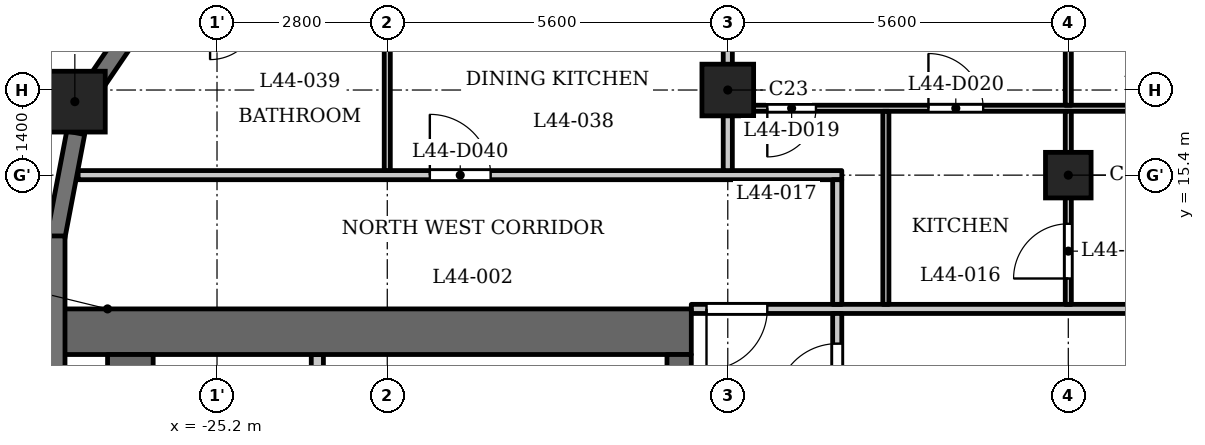
"""IFC4 building model, lengths in metres.
Left out: names, types, materials, properties, quantities, classifications, styles, units other than length and angle.
Written with IfcOpenShell. Run it as: python <this file> out.ifc"""

import sys

from ifc_helpers import new_model, si_unit, direction, frame, frame_2d, origin, origin_2d, place, context, subcontext, project, spatial, rectangle, extrude, element, fill, save


model = new_model("IFC4")
c1 = context("Model", 3, precision=1e-05, world=origin(), true_north=direction((0.0, 1.0)))
c2 = subcontext(c1, "Body", "Model", "MODEL_VIEW")
j1 = project(units=[si_unit("LENGTHUNIT", "METRE"), si_unit("PLANEANGLEUNIT", "RADIAN")], contexts=[c1])
p1 = place(None, origin())
s1 = spatial("IfcSite", under=j1, at=p1, CompositionType="ELEMENT")
p2 = place(p1, origin())
s2 = spatial("IfcBuilding", under=s1, at=p2, CompositionType="ELEMENT")
p3 = place(p2, frame((0.0, 0.0, 171.1)))
s3 = spatial("IfcBuildingStorey", under=s2, at=p3, CompositionType="ELEMENT", Elevation=171.1)
p4 = place(p3, frame((-27.538, 16.609, 0.0), z_axis=(0.0, 0.0, 1.0), x_axis=(1.0, 0.0, 0.0)))
e1 = element("IfcColumn", 1, at=p4, inside=s3, PredefinedType="COLUMN", context=c2, shape_type="SweptSolid", body=[
    extrude(rectangle(XDim=1.0, YDim=1.0, at=origin_2d()), origin(), (0.0, 0.0, 1.0), 3.5),
])
p5 = place(p3, frame((-16.8, 16.8, 0.0), z_axis=(0.0, 0.0, 1.0), x_axis=(1.0, 0.0, 0.0)))
e2 = element("IfcColumn", 2, at=p5, inside=s3, PredefinedType="COLUMN", context=c2, shape_type="SweptSolid", body=[
    extrude(rectangle(XDim=0.85, YDim=0.85, at=origin_2d()), origin(), (0.0, 0.0, 1.0), 3.5),
])
p6 = place(p3, frame((-11.2, 15.4, 0.0), z_axis=(0.0, 0.0, 1.0), x_axis=(1.0, 0.0, 0.0)))
e3 = element("IfcColumn", 3, at=p6, inside=s3, PredefinedType="COLUMN", context=c2, shape_type="SweptSolid", body=[
    extrude(rectangle(XDim=0.75, YDim=0.75, at=origin_2d()), origin(), (0.0, 0.0, 1.0), 3.5),
])
p7 = place(p3, frame((-26.504, 17.934, 0.0), z_axis=(0.0, 0.0, 1.0), x_axis=(-0.562145470373, -0.827038372833, 0.0)))
e4 = element("IfcWall", 4, at=p7, inside=s3, PredefinedType="SOLIDWALL", context=c2, shape_type="SweptSolid", body=[
    extrude(rectangle(XDim=1.177, YDim=0.3, at=frame_2d((0.588, 0.0))), origin(), (0.0, 0.0, 1.0), 3.2),
])
p8 = place(p3, frame((-27.524, 16.097, 0.0), z_axis=(0.0, 0.0, 1.0), x_axis=(-0.187259034321, -0.982310569049, 0.0)))
e5 = element("IfcWall", 5, at=p8, inside=s3, PredefinedType="SOLIDWALL", context=c2, shape_type="SweptSolid", body=[
    extrude(rectangle(XDim=1.756, YDim=0.3, at=frame_2d((0.878, 0.0))), origin(), (0.0, 0.0, 1.0), 2.45),
])
p9 = place(p3, frame((-27.85, 14.4, 0.0), z_axis=(0.0, 0.0, 1.0), x_axis=(0.0, -1.0, 0.0)))
e6 = element("IfcWall", 6, at=p9, inside=s3, PredefinedType="SOLIDWALL", context=c2, shape_type="SweptSolid", body=[
    extrude(rectangle(XDim=2.7, YDim=0.3, at=frame_2d((1.35, 0.0))), origin(), (0.0, 0.0, 1.0), 2.45),
])
p10 = place(p3, frame((-17.4, 12.825, 0.0), z_axis=(0.0, 0.0, 1.0), x_axis=(-1.0, 0.0, 0.0)))
e7 = element("IfcWall", 7, at=p10, inside=s3, PredefinedType="SHEAR", context=c2, shape_type="SweptSolid", body=[
    extrude(rectangle(XDim=10.4, YDim=0.75, at=frame_2d((5.2, 0.0))), origin(), (0.0, 0.0, 1.0), 3.2),
])
p11 = place(p3, frame((-17.6, -12.45, 0.0), z_axis=(0.0, 0.0, 1.0), x_axis=(0.0, 1.0, 0.0)))
e8 = element("IfcWall", 8, at=p11, inside=s3, PredefinedType="SHEAR", context=c2, shape_type="SweptSolid", body=[
    extrude(rectangle(XDim=24.9, YDim=0.4, at=frame_2d((12.45, 0.0))), origin(), (0.0, 0.0, 1.0), 3.2),
])
p12 = place(p11, frame((8.65, 0.0, 0.0)))
e9 = element("IfcOpeningElement", 9, at=p12, cuts=e8, PredefinedType="OPENING", context=c2, shape_type="SweptSolid", body=[
    extrude(rectangle(XDim=0.9, YDim=2.1, at=frame_2d((0.45, 1.05))), frame((0.0, 0.21, 0.0), z_axis=(0.0, -1.0, 0.0), x_axis=(1.0, 0.0, 0.0)), (0.0, 0.0, 1.0), 0.42),
])
p13 = place(p11, frame((15.6, 0.0, 0.0)))
e10 = element("IfcOpeningElement", 10, at=p13, cuts=e8, PredefinedType="OPENING", context=c2, shape_type="SweptSolid", body=[
    extrude(rectangle(XDim=1.1, YDim=2.1, at=frame_2d((0.55, 1.05))), frame((0.0, 0.21, 0.0), z_axis=(0.0, -1.0, 0.0), x_axis=(1.0, 0.0, 0.0)), (0.0, 0.0, 1.0), 0.42),
])
p14 = place(p11, frame((18.0, 0.0, 0.0)))
e11 = element("IfcOpeningElement", 11, at=p14, cuts=e8, PredefinedType="OPENING", context=c2, shape_type="SweptSolid", body=[
    extrude(rectangle(XDim=1.1, YDim=2.1, at=frame_2d((0.55, 1.05))), frame((0.0, 0.21, 0.0), z_axis=(0.0, -1.0, 0.0), x_axis=(1.0, 0.0, 0.0)), (0.0, 0.0, 1.0), 0.42),
])
p15 = place(p11, frame((23.025, 0.0, 0.0)))
e12 = element("IfcOpeningElement", 12, at=p15, cuts=e8, PredefinedType="OPENING", context=c2, shape_type="SweptSolid", body=[
    extrude(rectangle(XDim=1.1, YDim=2.1, at=frame_2d((0.55, 1.05))), frame((0.0, 0.21, 0.0), z_axis=(0.0, -1.0, 0.0), x_axis=(1.0, 0.0, 0.0)), (0.0, 0.0, 1.0), 0.42),
])
p16 = place(p11, frame((0.775, 0.0, 0.0)))
e13 = element("IfcOpeningElement", 13, at=p16, cuts=e8, PredefinedType="OPENING", context=c2, shape_type="SweptSolid", body=[
    extrude(rectangle(XDim=1.1, YDim=2.1, at=frame_2d((0.55, 1.05))), frame((0.0, 0.21, 0.0), z_axis=(0.0, -1.0, 0.0), x_axis=(1.0, 0.0, 0.0)), (0.0, 0.0, 1.0), 0.42),
])
p17 = place(p11, frame((12.925, 0.0, 0.0)))
e14 = element("IfcOpeningElement", 14, at=p17, cuts=e8, PredefinedType="OPENING", context=c2, shape_type="SweptSolid", body=[
    extrude(rectangle(XDim=1.8, YDim=2.1, at=frame_2d((0.9, 1.05))), frame((0.0, 0.21, 0.0), z_axis=(0.0, -1.0, 0.0), x_axis=(1.0, 0.0, 0.0)), (0.0, 0.0, 1.0), 0.42),
])
p18 = place(p3, frame((-26.625, -12.45, 0.0), z_axis=(0.0, 0.0, 1.0), x_axis=(0.0, 1.0, 0.0)))
e15 = element("IfcWall", 15, at=p18, inside=s3, PredefinedType="SHEAR", context=c2, shape_type="SweptSolid", body=[
    extrude(rectangle(XDim=24.9, YDim=0.75, at=frame_2d((12.45, 0.0))), origin(), (0.0, 0.0, 1.0), 3.2),
])
p19 = place(p3, frame((-23.55, 9.8, 0.0), z_axis=(0.0, 0.0, 1.0), x_axis=(0.0, 1.0, 0.0)))
e16 = element("IfcWall", 16, at=p19, inside=s3, PredefinedType="PARTITIONING", context=c2, shape_type="SweptSolid", body=[
    extrude(rectangle(XDim=2.65, YDim=0.2, at=frame_2d((1.325, 0.0))), origin(), (0.0, 0.0, 1.0), 3.2),
])
p20 = place(p19, frame((0.875, 0.0, 0.0)))
e17 = element("IfcOpeningElement", 17, at=p20, cuts=e16, PredefinedType="OPENING", context=c2, shape_type="SweptSolid", body=[
    extrude(rectangle(XDim=0.9, YDim=2.1, at=frame_2d((0.45, 1.05))), frame((0.0, 0.11, 0.0), z_axis=(0.0, -1.0, 0.0), x_axis=(1.0, 0.0, 0.0)), (0.0, 0.0, 1.0), 0.22),
])
p21 = place(p3, frame((-17.4, 13.2, 0.0), z_axis=(0.0, 0.0, 1.0), x_axis=(1.0, 0.0, 0.0)))
e18 = element("IfcWall", 18, at=p21, inside=s3, PredefinedType="PARTITIONING", context=c2, shape_type="SweptSolid", body=[
    extrude(rectangle(XDim=34.8, YDim=0.15, at=frame_2d((17.4, 0.0))), origin(), (0.0, 0.0, 1.0), 3.2),
])
p22 = place(p21, frame((0.25, 0.0, 0.0)))
e19 = element("IfcOpeningElement", 19, at=p22, cuts=e18, PredefinedType="OPENING", context=c2, shape_type="SweptSolid", body=[
    extrude(rectangle(XDim=1.0, YDim=2.1, at=frame_2d((0.5, 1.05))), frame((0.0, 0.085, 0.0), z_axis=(0.0, -1.0, 0.0), x_axis=(1.0, 0.0, 0.0)), (0.0, 0.0, 1.0), 0.17),
])
p23 = place(p21, frame((33.65, 0.0, 0.0)))
e20 = element("IfcOpeningElement", 20, at=p23, cuts=e18, PredefinedType="OPENING", context=c2, shape_type="SweptSolid", body=[
    extrude(rectangle(XDim=1.0, YDim=2.1, at=frame_2d((0.5, 1.05))), frame((0.0, 0.085, 0.0), z_axis=(0.0, -1.0, 0.0), x_axis=(1.0, 0.0, 0.0)), (0.0, 0.0, 1.0), 0.17),
])
p24 = place(p21, frame((10.15, 0.0, 0.0)))
e21 = element("IfcOpeningElement", 21, at=p24, cuts=e18, PredefinedType="OPENING", context=c2, shape_type="SweptSolid", body=[
    extrude(rectangle(XDim=1.0, YDim=2.1, at=frame_2d((0.5, 1.05))), frame((0.0, 0.085, 0.0), z_axis=(0.0, -1.0, 0.0), x_axis=(1.0, 0.0, 0.0)), (0.0, 0.0, 1.0), 0.17),
])
p25 = place(p21, frame((15.75, 0.0, 0.0)))
e22 = element("IfcOpeningElement", 22, at=p25, cuts=e18, PredefinedType="OPENING", context=c2, shape_type="SweptSolid", body=[
    extrude(rectangle(XDim=1.0, YDim=2.1, at=frame_2d((0.5, 1.05))), frame((0.0, 0.085, 0.0), z_axis=(0.0, -1.0, 0.0), x_axis=(1.0, 0.0, 0.0)), (0.0, 0.0, 1.0), 0.17),
])
p26 = place(p21, frame((24.95, 0.0, 0.0)))
e23 = element("IfcOpeningElement", 23, at=p26, cuts=e18, PredefinedType="OPENING", context=c2, shape_type="SweptSolid", body=[
    extrude(rectangle(XDim=1.0, YDim=2.1, at=frame_2d((0.5, 1.05))), frame((0.0, 0.085, 0.0), z_axis=(0.0, -1.0, 0.0), x_axis=(1.0, 0.0, 0.0)), (0.0, 0.0, 1.0), 0.17),
])
p27 = place(p21, frame((29.95, 0.0, 0.0)))
e24 = element("IfcOpeningElement", 24, at=p27, cuts=e18, PredefinedType="OPENING", context=c2, shape_type="SweptSolid", body=[
    extrude(rectangle(XDim=1.0, YDim=2.1, at=frame_2d((0.5, 1.05))), frame((0.0, 0.085, 0.0), z_axis=(0.0, -1.0, 0.0), x_axis=(1.0, 0.0, 0.0)), (0.0, 0.0, 1.0), 0.17),
])
p28 = place(p3, frame((-27.484, 15.4, 0.0), z_axis=(0.0, 0.0, 1.0), x_axis=(1.0, 0.0, 0.0)))
e25 = element("IfcWall", 25, at=p28, inside=s3, PredefinedType="PARTITIONING", context=c2, shape_type="SweptSolid", body=[
    extrude(rectangle(XDim=12.559, YDim=0.15, at=frame_2d((6.279, 0.0))), origin(), (0.0, 0.0, 1.0), 3.2),
])
p29 = place(p28, frame((5.784, 0.0, 0.0)))
e26 = element("IfcOpeningElement", 26, at=p29, cuts=e25, PredefinedType="OPENING", context=c2, shape_type="SweptSolid", body=[
    extrude(rectangle(XDim=1.0, YDim=2.1, at=frame_2d((0.5, 1.05))), frame((0.0, 0.085, 0.0), z_axis=(0.0, -1.0, 0.0), x_axis=(1.0, 0.0, 0.0)), (0.0, 0.0, 1.0), 0.17),
])
p30 = place(p3, frame((-16.725, 16.5, 0.0), z_axis=(0.0, 0.0, 1.0), x_axis=(1.0, 0.0, 0.0)))
e27 = element("IfcWall", 27, at=p30, inside=s3, PredefinedType="PARTITIONING", context=c2, shape_type="SweptSolid", body=[
    extrude(rectangle(XDim=33.45, YDim=0.1, at=frame_2d((16.725, 0.0))), origin(), (0.0, 0.0, 1.0), 3.2),
])
p31 = place(p30, frame((0.575, 0.0, 0.0)))
e28 = element("IfcOpeningElement", 28, at=p31, cuts=e27, PredefinedType="OPENING", context=c2, shape_type="SweptSolid", body=[
    extrude(rectangle(XDim=0.8, YDim=2.1, at=frame_2d((0.4, 1.05))), frame((0.0, 0.06, 0.0), z_axis=(0.0, -1.0, 0.0), x_axis=(1.0, 0.0, 0.0)), (0.0, 0.0, 1.0), 0.12),
])
p32 = place(p30, frame((3.225, 0.0, 0.0)))
e29 = element("IfcOpeningElement", 29, at=p32, cuts=e27, PredefinedType="OPENING", context=c2, shape_type="SweptSolid", body=[
    extrude(rectangle(XDim=0.9, YDim=2.1, at=frame_2d((0.45, 1.05))), frame((0.0, 0.06, 0.0), z_axis=(0.0, -1.0, 0.0), x_axis=(1.0, 0.0, 0.0)), (0.0, 0.0, 1.0), 0.12),
])
p33 = place(p30, frame((6.775, 0.0, 0.0)))
e30 = element("IfcOpeningElement", 30, at=p33, cuts=e27, PredefinedType="OPENING", context=c2, shape_type="SweptSolid", body=[
    extrude(rectangle(XDim=0.9, YDim=2.1, at=frame_2d((0.45, 1.05))), frame((0.0, 0.06, 0.0), z_axis=(0.0, -1.0, 0.0), x_axis=(1.0, 0.0, 0.0)), (0.0, 0.0, 1.0), 0.12),
])
p34 = place(p30, frame((8.825, 0.0, 0.0)))
e31 = element("IfcOpeningElement", 31, at=p34, cuts=e27, PredefinedType="OPENING", context=c2, shape_type="SweptSolid", body=[
    extrude(rectangle(XDim=0.9, YDim=2.1, at=frame_2d((0.45, 1.05))), frame((0.0, 0.06, 0.0), z_axis=(0.0, -1.0, 0.0), x_axis=(1.0, 0.0, 0.0)), (0.0, 0.0, 1.0), 0.12),
])
p35 = place(p30, frame((20.775, 0.0, 0.0)))
e32 = element("IfcOpeningElement", 32, at=p35, cuts=e27, PredefinedType="OPENING", context=c2, shape_type="SweptSolid", body=[
    extrude(rectangle(XDim=0.8, YDim=2.1, at=frame_2d((0.4, 1.05))), frame((0.0, 0.06, 0.0), z_axis=(0.0, -1.0, 0.0), x_axis=(1.0, 0.0, 0.0)), (0.0, 0.0, 1.0), 0.12),
])
p36 = place(p30, frame((17.325, 0.0, 0.0)))
e33 = element("IfcOpeningElement", 33, at=p36, cuts=e27, PredefinedType="OPENING", context=c2, shape_type="SweptSolid", body=[
    extrude(rectangle(XDim=0.9, YDim=2.1, at=frame_2d((0.45, 1.05))), frame((0.0, 0.06, 0.0), z_axis=(0.0, -1.0, 0.0), x_axis=(1.0, 0.0, 0.0)), (0.0, 0.0, 1.0), 0.12),
])
p37 = place(p30, frame((12.375, 0.0, 0.0)))
e34 = element("IfcOpeningElement", 34, at=p37, cuts=e27, PredefinedType="OPENING", context=c2, shape_type="SweptSolid", body=[
    extrude(rectangle(XDim=0.9, YDim=2.1, at=frame_2d((0.45, 1.05))), frame((0.0, 0.06, 0.0), z_axis=(0.0, -1.0, 0.0), x_axis=(1.0, 0.0, 0.0)), (0.0, 0.0, 1.0), 0.12),
])
p38 = place(p30, frame((14.425, 0.0, 0.0)))
e35 = element("IfcOpeningElement", 35, at=p38, cuts=e27, PredefinedType="OPENING", context=c2, shape_type="SweptSolid", body=[
    extrude(rectangle(XDim=0.9, YDim=2.1, at=frame_2d((0.45, 1.05))), frame((0.0, 0.06, 0.0), z_axis=(0.0, -1.0, 0.0), x_axis=(1.0, 0.0, 0.0)), (0.0, 0.0, 1.0), 0.12),
])
p39 = place(p30, frame((26.575, 0.0, 0.0)))
e36 = element("IfcOpeningElement", 36, at=p39, cuts=e27, PredefinedType="OPENING", context=c2, shape_type="SweptSolid", body=[
    extrude(rectangle(XDim=0.8, YDim=2.1, at=frame_2d((0.4, 1.05))), frame((0.0, 0.06, 0.0), z_axis=(0.0, -1.0, 0.0), x_axis=(1.0, 0.0, 0.0)), (0.0, 0.0, 1.0), 0.12),
])
p40 = place(p30, frame((23.775, 0.0, 0.0)))
e37 = element("IfcOpeningElement", 37, at=p40, cuts=e27, PredefinedType="OPENING", context=c2, shape_type="SweptSolid", body=[
    extrude(rectangle(XDim=0.9, YDim=2.1, at=frame_2d((0.45, 1.05))), frame((0.0, 0.06, 0.0), z_axis=(0.0, -1.0, 0.0), x_axis=(1.0, 0.0, 0.0)), (0.0, 0.0, 1.0), 0.12),
])
p41 = place(p30, frame((32.075, 0.0, 0.0)))
e38 = element("IfcOpeningElement", 38, at=p41, cuts=e27, PredefinedType="OPENING", context=c2, shape_type="SweptSolid", body=[
    extrude(rectangle(XDim=0.8, YDim=2.1, at=frame_2d((0.4, 1.05))), frame((0.0, 0.06, 0.0), z_axis=(0.0, -1.0, 0.0), x_axis=(1.0, 0.0, 0.0)), (0.0, 0.0, 1.0), 0.12),
])
p42 = place(p30, frame((29.375, 0.0, 0.0)))
e39 = element("IfcOpeningElement", 39, at=p42, cuts=e27, PredefinedType="OPENING", context=c2, shape_type="SweptSolid", body=[
    extrude(rectangle(XDim=0.9, YDim=2.1, at=frame_2d((0.45, 1.05))), frame((0.0, 0.06, 0.0), z_axis=(0.0, -1.0, 0.0), x_axis=(1.0, 0.0, 0.0)), (0.0, 0.0, 1.0), 0.12),
])
p43 = place(p3, frame((-22.4, 15.475, 0.0), z_axis=(0.0, 0.0, 1.0), x_axis=(0.0, 1.0, 0.0)))
e40 = element("IfcWall", 40, at=p43, inside=s3, PredefinedType="PARTITIONING", context=c2, shape_type="SweptSolid", body=[
    extrude(rectangle(XDim=2.575, YDim=0.1, at=frame_2d((1.288, 0.0))), origin(), (0.0, 0.0, 1.0), 3.2),
])
p44 = place(p3, frame((-16.8, 15.475, 0.0), z_axis=(0.0, 0.0, 1.0), x_axis=(0.0, 1.0, 0.0)))
e41 = element("IfcWall", 41, at=p44, inside=s3, PredefinedType="PARTITIONING", context=c2, shape_type="SweptSolid", body=[
    extrude(rectangle(XDim=7.405, YDim=0.15, at=frame_2d((3.702, 0.0))), origin(), (0.0, 0.0, 1.0), 3.2),
])
p45 = place(p3, frame((-15.0, 6.769, 0.0), z_axis=(0.0, 0.0, 1.0), x_axis=(0.0, 1.0, 0.0)))
e42 = element("IfcWall", 42, at=p45, inside=s3, PredefinedType="PARTITIONING", context=c2, shape_type="SweptSolid", body=[
    extrude(rectangle(XDim=6.356, YDim=0.15, at=frame_2d((3.178, 0.0))), origin(), (0.0, 0.0, 1.0), 3.2),
])
p46 = place(p45, frame((4.86, 0.0, 0.0)))
e43 = element("IfcOpeningElement", 43, at=p46, cuts=e42, PredefinedType="OPENING", context=c2, shape_type="SweptSolid", body=[
    extrude(rectangle(XDim=1.0, YDim=2.1, at=frame_2d((0.5, 1.05))), frame((0.0, 0.085, 0.0), z_axis=(0.0, -1.0, 0.0), x_axis=(1.0, 0.0, 0.0)), (0.0, 0.0, 1.0), 0.17),
])
p47 = place(p3, frame((-15.0, 13.275, 0.0), z_axis=(0.0, 0.0, 1.0), x_axis=(0.0, 1.0, 0.0)))
e44 = element("IfcWall", 44, at=p47, inside=s3, PredefinedType="PARTITIONING", context=c2, shape_type="SweptSolid", body=[
    extrude(rectangle(XDim=2.05, YDim=0.15, at=frame_2d((1.025, 0.0))), origin(), (0.0, 0.0, 1.0), 3.2),
])
p48 = place(p3, frame((-14.2, 13.275, 0.0), z_axis=(0.0, 0.0, 1.0), x_axis=(0.0, 1.0, 0.0)))
e45 = element("IfcWall", 45, at=p48, inside=s3, PredefinedType="PARTITIONING", context=c2, shape_type="SweptSolid", body=[
    extrude(rectangle(XDim=3.175, YDim=0.1, at=frame_2d((1.587, 0.0))), origin(), (0.0, 0.0, 1.0), 3.2),
])
p49 = place(p3, frame((-11.2, 13.275, 0.0), z_axis=(0.0, 0.0, 1.0), x_axis=(0.0, 1.0, 0.0)))
e46 = element("IfcWall", 46, at=p49, inside=s3, PredefinedType="PARTITIONING", context=c2, shape_type="SweptSolid", body=[
    extrude(rectangle(XDim=3.175, YDim=0.1, at=frame_2d((1.587, 0.0))), origin(), (0.0, 0.0, 1.0), 3.2),
])
p50 = place(p49, frame((0.425, 0.0, 0.0)))
e47 = element("IfcOpeningElement", 47, at=p50, cuts=e46, PredefinedType="OPENING", context=c2, shape_type="SweptSolid", body=[
    extrude(rectangle(XDim=0.9, YDim=2.1, at=frame_2d((0.45, 1.05))), frame((0.0, 0.06, 0.0), z_axis=(0.0, -1.0, 0.0), x_axis=(1.0, 0.0, 0.0)), (0.0, 0.0, 1.0), 0.12),
])
p51 = place(p3, frame((-11.2, 16.55, 0.0), z_axis=(0.0, 0.0, 1.0), x_axis=(0.0, 1.0, 0.0)))
e48 = element("IfcWall", 48, at=p51, inside=s3, PredefinedType="PARTITIONING", context=c2, shape_type="SweptSolid", body=[
    extrude(rectangle(XDim=6.33, YDim=0.1, at=frame_2d((3.165, 0.0))), origin(), (0.0, 0.0, 1.0), 3.2),
])
p52 = place(p46, origin())
e49 = element("IfcDoor", 49, at=p52, inside=s3, OperationType="SINGLE_SWING_RIGHT", PredefinedType="DOOR", context=c2, shape_type="SweptSolid", body=[
    extrude(rectangle(XDim=1.0, YDim=2.1, at=frame_2d((0.5, 1.05))), frame((0.0, 0.025, 0.0), z_axis=(0.0, -1.0, 0.0), x_axis=(1.0, 0.0, 0.0)), (0.0, 0.0, 1.0), 0.05),
])
fill(e43, e49)
p53 = place(p22, origin())
e50 = element("IfcDoor", 50, at=p53, inside=s3, OperationType="SINGLE_SWING_LEFT", PredefinedType="DOOR", context=c2, shape_type="SweptSolid", body=[
    extrude(rectangle(XDim=1.0, YDim=2.1, at=frame_2d((0.5, 1.05))), frame((0.0, 0.025, 0.0), z_axis=(0.0, -1.0, 0.0), x_axis=(1.0, 0.0, 0.0)), (0.0, 0.0, 1.0), 0.05),
])
fill(e19, e50)
p54 = place(p50, origin())
e51 = element("IfcDoor", 51, at=p54, inside=s3, OperationType="SINGLE_SWING_RIGHT", PredefinedType="DOOR", context=c2, shape_type="SweptSolid", body=[
    extrude(rectangle(XDim=0.9, YDim=2.1, at=frame_2d((0.45, 1.05))), frame((0.0, 0.025, 0.0), z_axis=(0.0, -1.0, 0.0), x_axis=(1.0, 0.0, 0.0)), (0.0, 0.0, 1.0), 0.05),
])
fill(e47, e51)
p55 = place(p31, origin())
e52 = element("IfcDoor", 52, at=p55, inside=s3, OperationType="SINGLE_SWING_LEFT", PredefinedType="DOOR", context=c2, shape_type="SweptSolid", body=[
    extrude(rectangle(XDim=0.8, YDim=2.1, at=frame_2d((0.4, 1.05))), frame((0.0, 0.025, 0.0), z_axis=(0.0, -1.0, 0.0), x_axis=(1.0, 0.0, 0.0)), (0.0, 0.0, 1.0), 0.05),
])
fill(e28, e52)
p56 = place(p32, origin())
e53 = element("IfcDoor", 53, at=p56, inside=s3, OperationType="SINGLE_SWING_RIGHT", PredefinedType="DOOR", context=c2, shape_type="SweptSolid", body=[
    extrude(rectangle(XDim=0.9, YDim=2.1, at=frame_2d((0.45, 1.05))), frame((0.0, 0.025, 0.0), z_axis=(0.0, -1.0, 0.0), x_axis=(1.0, 0.0, 0.0)), (0.0, 0.0, 1.0), 0.05),
])
fill(e29, e53)
p57 = place(p29, origin())
e54 = element("IfcDoor", 54, at=p57, inside=s3, OperationType="SINGLE_SWING_RIGHT", PredefinedType="DOOR", context=c2, shape_type="SweptSolid", body=[
    extrude(rectangle(XDim=1.0, YDim=2.1, at=frame_2d((0.5, 1.05))), frame((0.0, 0.025, 0.0), z_axis=(0.0, -1.0, 0.0), x_axis=(1.0, 0.0, 0.0)), (0.0, 0.0, 1.0), 0.05),
])
fill(e26, e54)
save(model, sys.argv[1])
